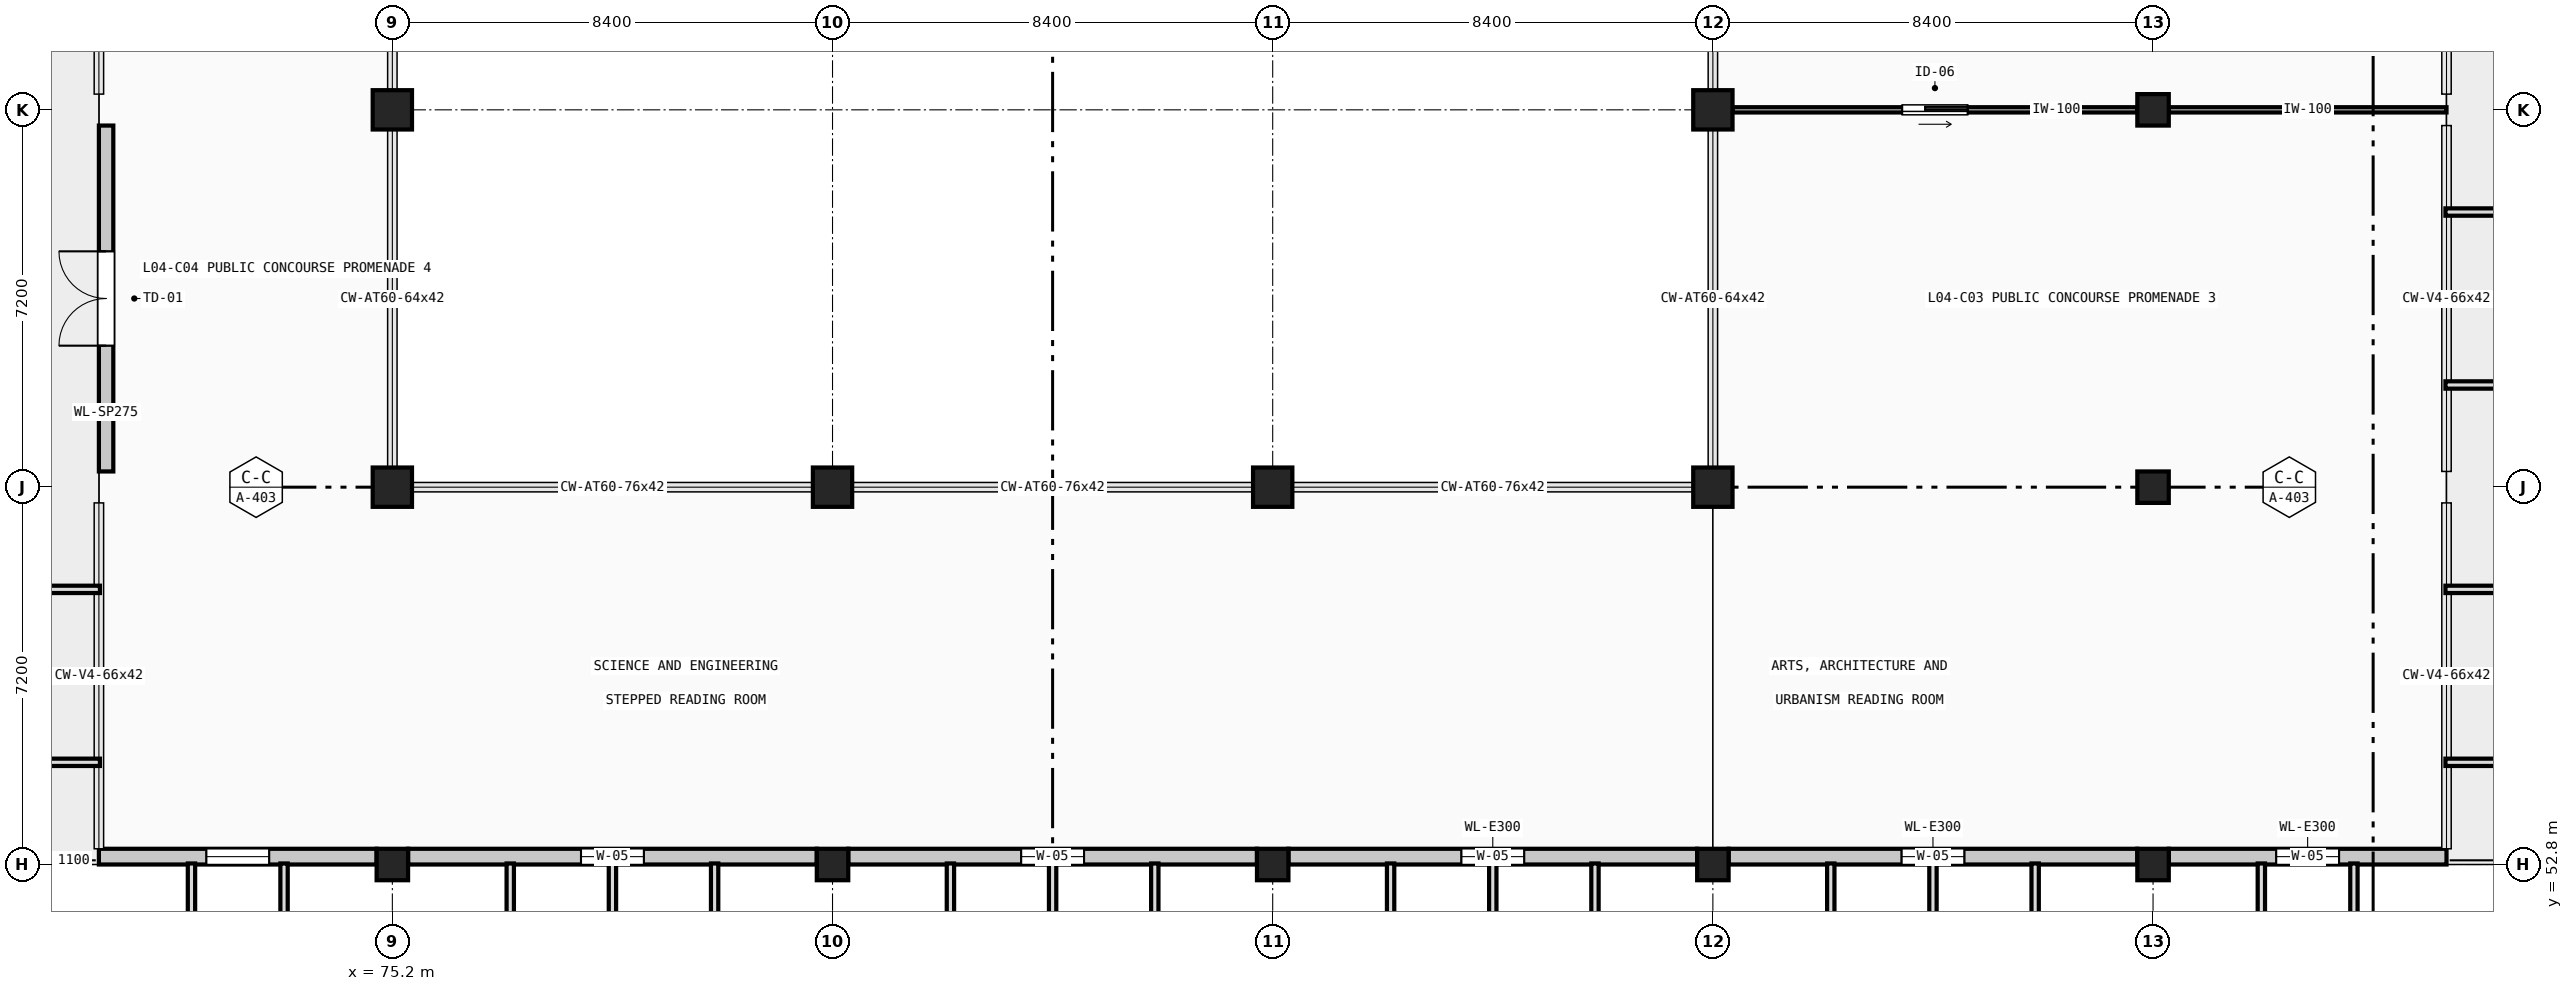
"""IFC4 building model, lengths in metres.
Left out: names, types, materials, properties, quantities, classifications, styles, units other than length and angle.
Written with IfcOpenShell. Run it as: python <this file> out.ifc"""

import sys

from ifc_helpers import new_model, si_unit, direction, frame, frame_2d, origin, origin_2d, place, context, subcontext, project, spatial, rectangle, circle, extrude, element, fill, save


model = new_model("IFC4")
c1 = context("Model", 3, precision=1e-05, world=origin(), true_north=direction((0.0, 1.0)))
c2 = subcontext(c1, "Body", "Model", "MODEL_VIEW")
j1 = project(units=[si_unit("LENGTHUNIT", "METRE"), si_unit("PLANEANGLEUNIT", "RADIAN")], contexts=[c1])
p1 = place(None, origin())
s1 = spatial("IfcSite", under=j1, at=p1, CompositionType="ELEMENT")
p2 = place(p1, origin())
s2 = spatial("IfcBuilding", under=s1, at=p2, CompositionType="ELEMENT")
p3 = place(p2, frame((0.0, 0.0, 18.88)))
s3 = spatial("IfcBuildingStorey", under=s2, at=p3, CompositionType="ELEMENT", Elevation=18.88)
p4 = place(p3, frame((75.2, 52.8, 0.0), z_axis=(0.0, 0.0, 1.0), x_axis=(1.0, 0.0, 0.0)))
e1 = element("IfcColumn", 1, at=p4, inside=s3, PredefinedType="COLUMN", context=c2, shape_type="SweptSolid", body=[
    extrude(rectangle(XDim=0.6, YDim=0.6, at=origin_2d()), origin(), (0.0, 0.0, 1.0), 4.48),
])
for number, where, z_axis, x_axis in (
    (2, (75.2, 60.0, 0.0), (0.0, 0.0, 1.0), (1.0, 0.0, 0.0)),
    (3, (75.2, 67.2, 0.0), (0.0, 0.0, 1.0), (1.0, 0.0, 0.0)),
):
    element("IfcColumn", number, at=place(p3, frame(where, z_axis=z_axis, x_axis=x_axis)), inside=s3, PredefinedType="COLUMN", context=c2, shape_type="SweptSolid", body=[
        extrude(circle(Radius=0.375, at=origin_2d()), origin(), (0.0, 0.0, 1.0), 4.48),
    ])
p5 = place(p3, frame((83.6, 52.8, 0.0), z_axis=(0.0, 0.0, 1.0), x_axis=(1.0, 0.0, 0.0)))
e4 = element("IfcColumn", 4, at=p5, inside=s3, PredefinedType="COLUMN", context=c2, shape_type="SweptSolid", body=[
    extrude(rectangle(XDim=0.6, YDim=0.6, at=origin_2d()), origin(), (0.0, 0.0, 1.0), 4.48),
])
p6 = place(p3, frame((83.6, 60.0, 0.0), z_axis=(0.0, 0.0, 1.0), x_axis=(1.0, 0.0, 0.0)))
e5 = element("IfcColumn", 5, at=p6, inside=s3, PredefinedType="COLUMN", context=c2, shape_type="SweptSolid", body=[
    extrude(circle(Radius=0.375, at=origin_2d()), origin(), (0.0, 0.0, 1.0), 4.48),
])
p7 = place(p3, frame((92.0, 52.8, 0.0), z_axis=(0.0, 0.0, 1.0), x_axis=(1.0, 0.0, 0.0)))
e6 = element("IfcColumn", 6, at=p7, inside=s3, PredefinedType="COLUMN", context=c2, shape_type="SweptSolid", body=[
    extrude(rectangle(XDim=0.6, YDim=0.6, at=origin_2d()), origin(), (0.0, 0.0, 1.0), 4.48),
])
p8 = place(p3, frame((92.0, 60.0, 0.0), z_axis=(0.0, 0.0, 1.0), x_axis=(1.0, 0.0, 0.0)))
e7 = element("IfcColumn", 7, at=p8, inside=s3, PredefinedType="COLUMN", context=c2, shape_type="SweptSolid", body=[
    extrude(circle(Radius=0.375, at=origin_2d()), origin(), (0.0, 0.0, 1.0), 4.48),
])
p9 = place(p3, frame((100.4, 52.8, 0.0), z_axis=(0.0, 0.0, 1.0), x_axis=(1.0, 0.0, 0.0)))
e8 = element("IfcColumn", 8, at=p9, inside=s3, PredefinedType="COLUMN", context=c2, shape_type="SweptSolid", body=[
    extrude(rectangle(XDim=0.6, YDim=0.6, at=origin_2d()), origin(), (0.0, 0.0, 1.0), 4.48),
])
for number, where, z_axis, x_axis in (
    (9, (100.4, 60.0, 0.0), (0.0, 0.0, 1.0), (1.0, 0.0, 0.0)),
    (10, (100.4, 67.2, 0.0), (0.0, 0.0, 1.0), (1.0, 0.0, 0.0)),
):
    element("IfcColumn", number, at=place(p3, frame(where, z_axis=z_axis, x_axis=x_axis)), inside=s3, PredefinedType="COLUMN", context=c2, shape_type="SweptSolid", body=[
        extrude(circle(Radius=0.375, at=origin_2d()), origin(), (0.0, 0.0, 1.0), 4.48),
    ])
for number, where, z_axis, x_axis in (
    (11, (108.8, 52.8, 0.0), (0.0, 0.0, 1.0), (1.0, 0.0, 0.0)),
    (12, (108.8, 60.0, 0.0), (0.0, 0.0, 1.0), (1.0, 0.0, 0.0)),
    (13, (108.8, 67.2, 0.0), (0.0, 0.0, 1.0), (1.0, 0.0, 0.0)),
):
    element("IfcColumn", number, at=place(p3, frame(where, z_axis=z_axis, x_axis=x_axis)), inside=s3, PredefinedType="COLUMN", context=c2, shape_type="SweptSolid", body=[
        extrude(rectangle(XDim=0.6, YDim=0.6, at=origin_2d()), origin(), (0.0, 0.0, 1.0), 4.48),
    ])
p10 = place(p3, frame((114.4, 52.95, 0.0), z_axis=(0.0, 0.0, 1.0), x_axis=(-1.0, 0.0, 0.0)))
e14 = element("IfcWall", 14, at=p10, inside=s3, PredefinedType="SOLIDWALL", context=c2, shape_type="SweptSolid", body=[
    extrude(rectangle(XDim=5.3, YDim=0.3, at=frame_2d((2.65, 0.0))), origin(), (0.0, 0.0, 1.0), 3.68),
])
p11 = place(p10, frame((2.05, 0.0, 0.9)))
e15 = element("IfcOpeningElement", 15, at=p11, cuts=e14, PredefinedType="OPENING", context=c2, shape_type="SweptSolid", body=[
    extrude(rectangle(XDim=1.2, YDim=2.4, at=frame_2d((0.6, 1.2))), frame((0.0, 0.16, 0.0), z_axis=(0.0, -1.0, 0.0), x_axis=(1.0, 0.0, 0.0)), (0.0, 0.0, 1.0), 0.32),
])
p12 = place(p3, frame((108.5, 52.95, 0.0), z_axis=(0.0, 0.0, 1.0), x_axis=(-1.0, 0.0, 0.0)))
e16 = element("IfcWall", 16, at=p12, inside=s3, PredefinedType="SOLIDWALL", context=c2, shape_type="SweptSolid", body=[
    extrude(rectangle(XDim=7.8, YDim=0.3, at=frame_2d((3.9, 0.0))), origin(), (0.0, 0.0, 1.0), 3.78),
])
p13 = place(p12, frame((3.3, 0.0, 0.9)))
e17 = element("IfcOpeningElement", 17, at=p13, cuts=e16, PredefinedType="OPENING", context=c2, shape_type="SweptSolid", body=[
    extrude(rectangle(XDim=1.2, YDim=2.4, at=frame_2d((0.6, 1.2))), frame((0.0, 0.16, 0.0), z_axis=(0.0, -1.0, 0.0), x_axis=(1.0, 0.0, 0.0)), (0.0, 0.0, 1.0), 0.32),
])
p14 = place(p3, frame((100.1, 52.95, 0.0), z_axis=(0.0, 0.0, 1.0), x_axis=(-1.0, 0.0, 0.0)))
e18 = element("IfcWall", 18, at=p14, inside=s3, PredefinedType="SOLIDWALL", context=c2, shape_type="SweptSolid", body=[
    extrude(rectangle(XDim=7.8, YDim=0.3, at=frame_2d((3.9, 0.0))), origin(), (0.0, 0.0, 1.0), 3.78),
])
p15 = place(p14, frame((3.3, 0.0, 0.9)))
e19 = element("IfcOpeningElement", 19, at=p15, cuts=e18, PredefinedType="OPENING", context=c2, shape_type="SweptSolid", body=[
    extrude(rectangle(XDim=1.2, YDim=2.4, at=frame_2d((0.6, 1.2))), frame((0.0, 0.16, 0.0), z_axis=(0.0, -1.0, 0.0), x_axis=(1.0, 0.0, 0.0)), (0.0, 0.0, 1.0), 0.32),
])
p16 = place(p3, frame((91.7, 52.95, 0.0), z_axis=(0.0, 0.0, 1.0), x_axis=(-1.0, 0.0, 0.0)))
e20 = element("IfcWall", 20, at=p16, inside=s3, PredefinedType="SOLIDWALL", context=c2, shape_type="SweptSolid", body=[
    extrude(rectangle(XDim=7.8, YDim=0.3, at=frame_2d((3.9, 0.0))), origin(), (0.0, 0.0, 1.0), 3.78),
])
p17 = place(p16, frame((3.3, 0.0, 0.9)))
e21 = element("IfcOpeningElement", 21, at=p17, cuts=e20, PredefinedType="OPENING", context=c2, shape_type="SweptSolid", body=[
    extrude(rectangle(XDim=1.2, YDim=2.4, at=frame_2d((0.6, 1.2))), frame((0.0, 0.16, 0.0), z_axis=(0.0, -1.0, 0.0), x_axis=(1.0, 0.0, 0.0)), (0.0, 0.0, 1.0), 0.32),
])
p18 = place(p3, frame((83.3, 52.95, 0.0), z_axis=(0.0, 0.0, 1.0), x_axis=(-1.0, 0.0, 0.0)))
e22 = element("IfcWall", 22, at=p18, inside=s3, PredefinedType="SOLIDWALL", context=c2, shape_type="SweptSolid", body=[
    extrude(rectangle(XDim=7.8, YDim=0.3, at=frame_2d((3.9, 0.0))), origin(), (0.0, 0.0, 1.0), 3.78),
])
p19 = place(p18, frame((3.3, 0.0, 0.9)))
e23 = element("IfcOpeningElement", 23, at=p19, cuts=e22, PredefinedType="OPENING", context=c2, shape_type="SweptSolid", body=[
    extrude(rectangle(XDim=1.2, YDim=2.4, at=frame_2d((0.6, 1.2))), frame((0.0, 0.16, 0.0), z_axis=(0.0, -1.0, 0.0), x_axis=(1.0, 0.0, 0.0)), (0.0, 0.0, 1.0), 0.32),
])
p20 = place(p3, frame((74.9, 52.95, 0.0), z_axis=(0.0, 0.0, 1.0), x_axis=(-1.0, 0.0, 0.0)))
e24 = element("IfcWall", 24, at=p20, inside=s3, PredefinedType="SOLIDWALL", context=c2, shape_type="SweptSolid", body=[
    extrude(rectangle(XDim=5.3, YDim=0.3, at=frame_2d((2.65, 0.0))), origin(), (0.0, 0.0, 1.0), 3.68),
])
p21 = place(p20, frame((2.05, 0.0, 0.9)))
e25 = element("IfcOpeningElement", 25, at=p21, cuts=e24, PredefinedType="OPENING", context=c2, shape_type="SweptSolid", body=[
    extrude(rectangle(XDim=1.2, YDim=2.4, at=frame_2d((0.6, 1.2))), frame((0.0, 0.16, 0.0), z_axis=(0.0, -1.0, 0.0), x_axis=(1.0, 0.0, 0.0)), (0.0, 0.0, 1.0), 0.32),
])
p22 = place(p3, frame((69.738, 60.3, 0.0), z_axis=(0.0, 0.0, 1.0), x_axis=(0.0, 1.0, 0.0)))
e26 = element("IfcWall", 26, at=p22, inside=s3, PredefinedType="SOLIDWALL", context=c2, shape_type="SweptSolid", body=[
    extrude(rectangle(XDim=6.6, YDim=0.275, at=frame_2d((3.3, 0.0))), origin(), (0.0, 0.0, 1.0), 4.255),
])
p23 = place(p22, frame((2.4, 0.0, 0.0)))
e27 = element("IfcOpeningElement", 27, at=p23, cuts=e26, PredefinedType="OPENING", context=c2, shape_type="SweptSolid", body=[
    extrude(rectangle(XDim=1.8, YDim=2.25, at=frame_2d((0.9, 1.125))), frame((0.0, 0.147, 0.0), z_axis=(0.0, -1.0, 0.0), x_axis=(1.0, 0.0, 0.0)), (0.0, 0.0, 1.0), 0.295),
])
p24 = place(p3, frame((114.4, 67.2, 0.0), z_axis=(0.0, 0.0, 1.0), x_axis=(-1.0, 0.0, 0.0)))
e28 = element("IfcWall", 28, at=p24, inside=s3, PredefinedType="MOVABLE", context=c2, shape_type="SweptSolid", body=[
    extrude(rectangle(XDim=5.3, YDim=0.1, at=frame_2d((2.65, 0.0))), origin(), (0.0, 0.0, 1.0), 4.255),
])
p25 = place(p3, frame((108.5, 67.2, 0.0), z_axis=(0.0, 0.0, 1.0), x_axis=(-1.0, 0.0, 0.0)))
e29 = element("IfcWall", 29, at=p25, inside=s3, PredefinedType="MOVABLE", context=c2, shape_type="SweptSolid", body=[
    extrude(rectangle(XDim=7.725, YDim=0.1, at=frame_2d((3.863, 0.0))), origin(), (0.0, 0.0, 1.0), 3.68),
])
p26 = place(p25, frame((3.238, 0.0, 0.0)))
e30 = element("IfcOpeningElement", 30, at=p26, cuts=e29, PredefinedType="OPENING", context=c2, shape_type="SweptSolid", body=[
    extrude(rectangle(XDim=1.25, YDim=2.2, at=frame_2d((0.625, 1.1))), frame((0.0, 0.06, 0.0), z_axis=(0.0, -1.0, 0.0), x_axis=(1.0, 0.0, 0.0)), (0.0, 0.0, 1.0), 0.12),
])
p27 = place(p11, origin())
e31 = element("IfcWindow", 31, at=p27, inside=s3, PartitioningType="SINGLE_PANEL", PredefinedType="WINDOW", context=c2, shape_type="SweptSolid", body=[
    extrude(rectangle(XDim=1.2, YDim=2.4, at=frame_2d((0.6, 1.2))), frame((0.0, 0.03, 0.0), z_axis=(0.0, -1.0, 0.0), x_axis=(1.0, 0.0, 0.0)), (0.0, 0.0, 1.0), 0.06),
])
fill(e15, e31)
p28 = place(p13, origin())
e32 = element("IfcWindow", 32, at=p28, inside=s3, PartitioningType="SINGLE_PANEL", PredefinedType="WINDOW", context=c2, shape_type="SweptSolid", body=[
    extrude(rectangle(XDim=1.2, YDim=2.4, at=frame_2d((0.6, 1.2))), frame((0.0, 0.03, 0.0), z_axis=(0.0, -1.0, 0.0), x_axis=(1.0, 0.0, 0.0)), (0.0, 0.0, 1.0), 0.06),
])
fill(e17, e32)
p29 = place(p15, origin())
e33 = element("IfcWindow", 33, at=p29, inside=s3, PartitioningType="SINGLE_PANEL", PredefinedType="WINDOW", context=c2, shape_type="SweptSolid", body=[
    extrude(rectangle(XDim=1.2, YDim=2.4, at=frame_2d((0.6, 1.2))), frame((0.0, 0.03, 0.0), z_axis=(0.0, -1.0, 0.0), x_axis=(1.0, 0.0, 0.0)), (0.0, 0.0, 1.0), 0.06),
])
fill(e19, e33)
p30 = place(p17, origin())
e34 = element("IfcWindow", 34, at=p30, inside=s3, PartitioningType="SINGLE_PANEL", PredefinedType="WINDOW", context=c2, shape_type="SweptSolid", body=[
    extrude(rectangle(XDim=1.2, YDim=2.4, at=frame_2d((0.6, 1.2))), frame((0.0, 0.03, 0.0), z_axis=(0.0, -1.0, 0.0), x_axis=(1.0, 0.0, 0.0)), (0.0, 0.0, 1.0), 0.06),
])
fill(e21, e34)
p31 = place(p19, origin())
e35 = element("IfcWindow", 35, at=p31, inside=s3, PartitioningType="SINGLE_PANEL", PredefinedType="WINDOW", context=c2, shape_type="SweptSolid", body=[
    extrude(rectangle(XDim=1.2, YDim=2.4, at=frame_2d((0.6, 1.2))), frame((0.0, 0.03, 0.0), z_axis=(0.0, -1.0, 0.0), x_axis=(1.0, 0.0, 0.0)), (0.0, 0.0, 1.0), 0.06),
])
fill(e23, e35)
p32 = place(p21, origin())
e36 = element("IfcWindow", 36, at=p32, inside=s3, PartitioningType="SINGLE_PANEL", PredefinedType="WINDOW", context=c2, shape_type="SweptSolid", body=[
    extrude(rectangle(XDim=1.2, YDim=2.4, at=frame_2d((0.6, 1.2))), frame((0.0, 0.03, 0.0), z_axis=(0.0, -1.0, 0.0), x_axis=(1.0, 0.0, 0.0)), (0.0, 0.0, 1.0), 0.06),
])
fill(e25, e36)
p33 = place(p23, origin())
e37 = element("IfcDoor", 37, at=p33, inside=s3, OperationType="DOUBLE_DOOR_SINGLE_SWING", PredefinedType="DOOR", context=c2, shape_type="SweptSolid", body=[
    extrude(rectangle(XDim=1.8, YDim=2.25, at=frame_2d((0.9, 1.125))), frame((0.0, 0.025, 0.0), z_axis=(0.0, -1.0, 0.0), x_axis=(1.0, 0.0, 0.0)), (0.0, 0.0, 1.0), 0.05),
])
fill(e27, e37)
p34 = place(p26, origin())
e38 = element("IfcDoor", 38, at=p34, inside=s3, OperationType="SLIDING_TO_LEFT", PredefinedType="DOOR", context=c2, shape_type="SweptSolid", body=[
    extrude(rectangle(XDim=1.25, YDim=2.2, at=frame_2d((0.625, 1.1))), frame((0.0, 0.025, 0.0), z_axis=(0.0, -1.0, 0.0), x_axis=(1.0, 0.0, 0.0)), (0.0, 0.0, 1.0), 0.05),
])
fill(e30, e38)
save(model, sys.argv[1])
